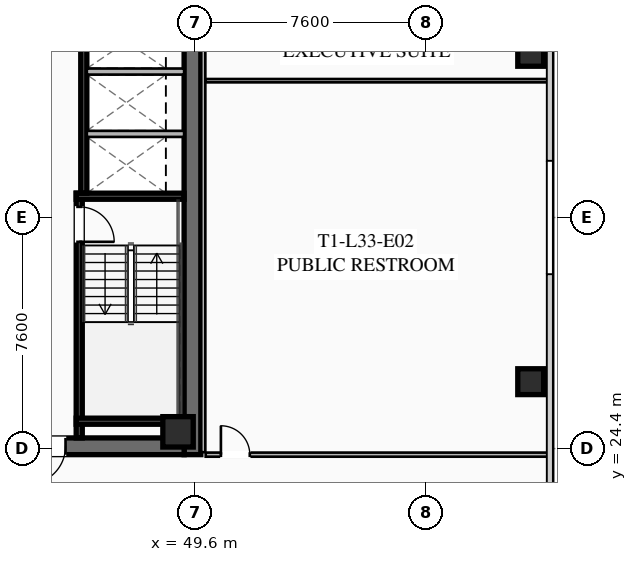
"""IFC4 building model, lengths in metres.
Left out: names, types, materials, properties, quantities, classifications, styles, units other than length and angle.
Written with IfcOpenShell. Run it as: python <this file> out.ifc"""

import sys

from ifc_helpers import new_model, si_unit, direction, frame, frame_2d, origin, origin_2d, place, context, subcontext, project, spatial, rectangle, hollow_rectangle, extrude, element, fill, save


model = new_model("IFC4")
c1 = context("Model", 3, precision=1e-05, world=origin(), true_north=direction((0.0, 1.0)))
c2 = subcontext(c1, "Body", "Model", "MODEL_VIEW")
j1 = project(units=[si_unit("LENGTHUNIT", "METRE"), si_unit("PLANEANGLEUNIT", "RADIAN")], contexts=[c1])
p1 = place(None, origin())
s1 = spatial("IfcSite", under=j1, at=p1, CompositionType="ELEMENT")
p2 = place(p1, origin())
s2 = spatial("IfcBuilding", under=s1, at=p2, CompositionType="ELEMENT")
p3 = place(p2, frame((0.0, 0.0, 125.05)))
s3 = spatial("IfcBuildingStorey", under=s2, at=p3, CompositionType="ELEMENT", Elevation=125.05)
p4 = place(p3, frame((49.525, 39.8, 0.0), z_axis=(0.0, 0.0, 1.0), x_axis=(0.0, -1.0, 0.0)))
e1 = element("IfcWall", 1, at=p4, inside=s3, PredefinedType="SHEAR", context=c2, shape_type="SweptSolid", body=[
    extrude(rectangle(XDim=15.6, YDim=0.55, at=frame_2d((7.8, 0.0))), origin(), (0.0, 0.0, 1.0), 3.55),
])
p5 = place(p3, frame((49.25, 24.475, 0.0), z_axis=(0.0, 0.0, 1.0), x_axis=(-1.0, 0.0, 0.0)))
e2 = element("IfcWall", 2, at=p5, inside=s3, PredefinedType="SHEAR", context=c2, shape_type="SweptSolid", body=[
    extrude(rectangle(XDim=14.5, YDim=0.55, at=frame_2d((7.25, 0.0))), origin(), (0.0, 0.0, 1.0), 3.55),
])
p6 = place(p5, frame((8.95, 0.0, 0.0)))
e3 = element("IfcOpeningElement", 3, at=p6, cuts=e2, PredefinedType="OPENING", context=c2, shape_type="SweptSolid", body=[
    extrude(rectangle(XDim=1.25, YDim=2.25, at=frame_2d((0.625, 1.125))), frame((0.0, 0.285, 0.0), z_axis=(0.0, -1.0, 0.0), x_axis=(1.0, 0.0, 0.0)), (0.0, 0.0, 1.0), 0.57),
])
p7 = place(p5, frame((3.9, 0.0, 0.0)))
e4 = element("IfcOpeningElement", 4, at=p7, cuts=e2, PredefinedType="OPENING", context=c2, shape_type="SweptSolid", body=[
    extrude(rectangle(XDim=1.25, YDim=2.25, at=frame_2d((0.625, 1.125))), frame((0.0, 0.285, 0.0), z_axis=(0.0, -1.0, 0.0), x_axis=(1.0, 0.0, 0.0)), (0.0, 0.0, 1.0), 0.57),
])
p8 = place(p3, frame((49.05, 24.95, 0.0), z_axis=(0.0, 0.0, 1.0), x_axis=(1.0, 0.0, 0.0)))
e5 = element("IfcColumn", 5, at=p8, inside=s3, PredefinedType="COLUMN", context=c2, shape_type="SweptSolid", body=[
    extrude(hollow_rectangle(XDim=1.0, YDim=1.0, WallThickness=0.04, at=origin_2d()), origin(), (0.0, 0.0, 1.0), 3.37),
])
for number, where, z_axis, x_axis in (
    (6, (60.65, 26.6, 0.0), (0.0, 0.0, 1.0), (1.0, 0.0, 0.0)),
    (7, (60.65, 37.4, 0.0), (0.0, 0.0, 1.0), (1.0, 0.0, 0.0)),
):
    element("IfcColumn", number, at=place(p3, frame(where, z_axis=z_axis, x_axis=x_axis)), inside=s3, PredefinedType="COLUMN", context=c2, shape_type="SweptSolid", body=[
        extrude(hollow_rectangle(XDim=0.85, YDim=0.85, WallThickness=0.035, at=origin_2d()), origin(), (0.0, 0.0, 1.0), 3.37),
    ])
p9 = place(p3, frame((45.8, 32.8, 0.0), z_axis=(0.0, 0.0, 1.0), x_axis=(0.0, -1.0, 0.0)))
e8 = element("IfcWall", 8, at=p9, inside=s3, PredefinedType="SHEAR", context=c2, shape_type="SweptSolid", body=[
    extrude(rectangle(XDim=8.05, YDim=0.2, at=frame_2d((4.025, 0.0))), origin(), (0.0, 0.0, 1.0), 3.37),
])
p10 = place(p9, frame((0.45, 0.0, 0.0)))
e9 = element("IfcOpeningElement", 9, at=p10, cuts=e8, PredefinedType="OPENING", context=c2, shape_type="SweptSolid", body=[
    extrude(rectangle(XDim=1.15, YDim=2.2, at=frame_2d((0.575, 1.1))), frame((0.0, 0.11, 0.0), z_axis=(0.0, -1.0, 0.0), x_axis=(1.0, 0.0, 0.0)), (0.0, 0.0, 1.0), 0.22),
])
for number, where, z_axis, x_axis in (
    (10, (45.7, 32.7, 0.0), (0.0, 0.0, 1.0), (1.0, 0.0, 0.0)),
    (11, (45.7, 25.3, 0.0), (0.0, 0.0, 1.0), (1.0, 0.0, 0.0)),
):
    element("IfcWall", number, at=place(p3, frame(where, z_axis=z_axis, x_axis=x_axis)), inside=s3, PredefinedType="SHEAR", context=c2, shape_type="SweptSolid", body=[
        extrude(rectangle(XDim=3.55, YDim=0.2, at=frame_2d((1.775, 0.0))), origin(), (0.0, 0.0, 1.0), 3.37),
    ])
p11 = place(p3, frame((45.95, 39.25, 0.0), z_axis=(0.0, 0.0, 1.0), x_axis=(0.0, -1.0, 0.0)))
e12 = element("IfcWall", 12, at=p11, inside=s3, PredefinedType="SHEAR", context=c2, shape_type="SweptSolid", body=[
    extrude(rectangle(XDim=6.45, YDim=0.2, at=frame_2d((3.225, 0.0))), origin(), (0.0, 0.0, 1.0), 3.37),
])
for number, where, z_axis, x_axis in (
    (13, (46.05, 34.75, 0.0), (0.0, 0.0, 1.0), (1.0, 0.0, 0.0)),
    (14, (46.05, 36.8, 0.0), (0.0, 0.0, 1.0), (1.0, 0.0, 0.0)),
):
    element("IfcWall", number, at=place(p3, frame(where, z_axis=z_axis, x_axis=x_axis)), inside=s3, PredefinedType="SOLIDWALL", context=c2, shape_type="SweptSolid", body=[
        extrude(rectangle(XDim=3.2, YDim=0.2, at=frame_2d((1.6, 0.0))), origin(), (0.0, 0.0, 1.0), 3.37),
    ])
p12 = place(p3, frame((49.88, 39.72, 0.0), z_axis=(0.0, 0.0, 1.0), x_axis=(0.0, -1.0, 0.0)))
e15 = element("IfcWall", 15, at=p12, inside=s3, PredefinedType="PARTITIONING", context=c2, shape_type="SweptSolid", body=[
    extrude(rectangle(XDim=15.44, YDim=0.135, at=frame_2d((7.72, 0.0))), origin(), (0.0, 0.0, 1.0), 2.723),
])
p13 = place(p3, frame((49.96, 24.2, 0.0), z_axis=(0.0, 0.0, 1.0), x_axis=(1.0, 0.0, 0.0)))
e16 = element("IfcWall", 16, at=p13, inside=s3, PredefinedType="PARTITIONING", context=c2, shape_type="SweptSolid", body=[
    extrude(rectangle(XDim=11.32, YDim=0.135, at=frame_2d((5.66, 0.0))), origin(), (0.0, 0.0, 1.0), 2.723),
])
p14 = place(p13, frame((0.5, 0.0, 0.0)))
e17 = element("IfcOpeningElement", 17, at=p14, cuts=e16, PredefinedType="OPENING", context=c2, shape_type="SweptSolid", body=[
    extrude(rectangle(XDim=0.95, YDim=2.05, at=frame_2d((0.475, 1.025))), frame((0.0, 0.077, 0.0), z_axis=(0.0, -1.0, 0.0), x_axis=(1.0, 0.0, 0.0)), (0.0, 0.0, 1.0), 0.155),
])
p15 = place(p3, frame((49.96, 36.5, 0.0), z_axis=(0.0, 0.0, 1.0), x_axis=(1.0, 0.0, 0.0)))
e18 = element("IfcWall", 18, at=p15, inside=s3, PredefinedType="PARTITIONING", context=c2, shape_type="SweptSolid", body=[
    extrude(rectangle(XDim=11.32, YDim=0.11, at=frame_2d((5.66, 0.0))), origin(), (0.0, 0.0, 1.0), 2.723),
])
p16 = place(p7, origin())
e19 = element("IfcDoor", 19, at=p16, inside=s3, OperationType="SINGLE_SWING_RIGHT", PredefinedType="DOOR", context=c2, shape_type="SweptSolid", body=[
    extrude(rectangle(XDim=1.25, YDim=2.25, at=frame_2d((0.625, 1.125))), frame((0.0, 0.025, 0.0), z_axis=(0.0, -1.0, 0.0), x_axis=(1.0, 0.0, 0.0)), (0.0, 0.0, 1.0), 0.05),
])
fill(e4, e19)
p17 = place(p10, origin())
e20 = element("IfcDoor", 20, at=p17, inside=s3, OperationType="SINGLE_SWING_RIGHT", PredefinedType="DOOR", context=c2, shape_type="SweptSolid", body=[
    extrude(rectangle(XDim=1.15, YDim=2.2, at=frame_2d((0.575, 1.1))), frame((0.0, 0.025, 0.0), z_axis=(0.0, -1.0, 0.0), x_axis=(1.0, 0.0, 0.0)), (0.0, 0.0, 1.0), 0.05),
])
fill(e9, e20)
p18 = place(p14, origin())
e21 = element("IfcDoor", 21, at=p18, inside=s3, OperationType="SINGLE_SWING_LEFT", PredefinedType="DOOR", context=c2, shape_type="SweptSolid", body=[
    extrude(rectangle(XDim=0.95, YDim=2.05, at=frame_2d((0.475, 1.025))), frame((0.0, 0.025, 0.0), z_axis=(0.0, -1.0, 0.0), x_axis=(1.0, 0.0, 0.0)), (0.0, 0.0, 1.0), 0.05),
])
fill(e17, e21)
save(model, sys.argv[1])
